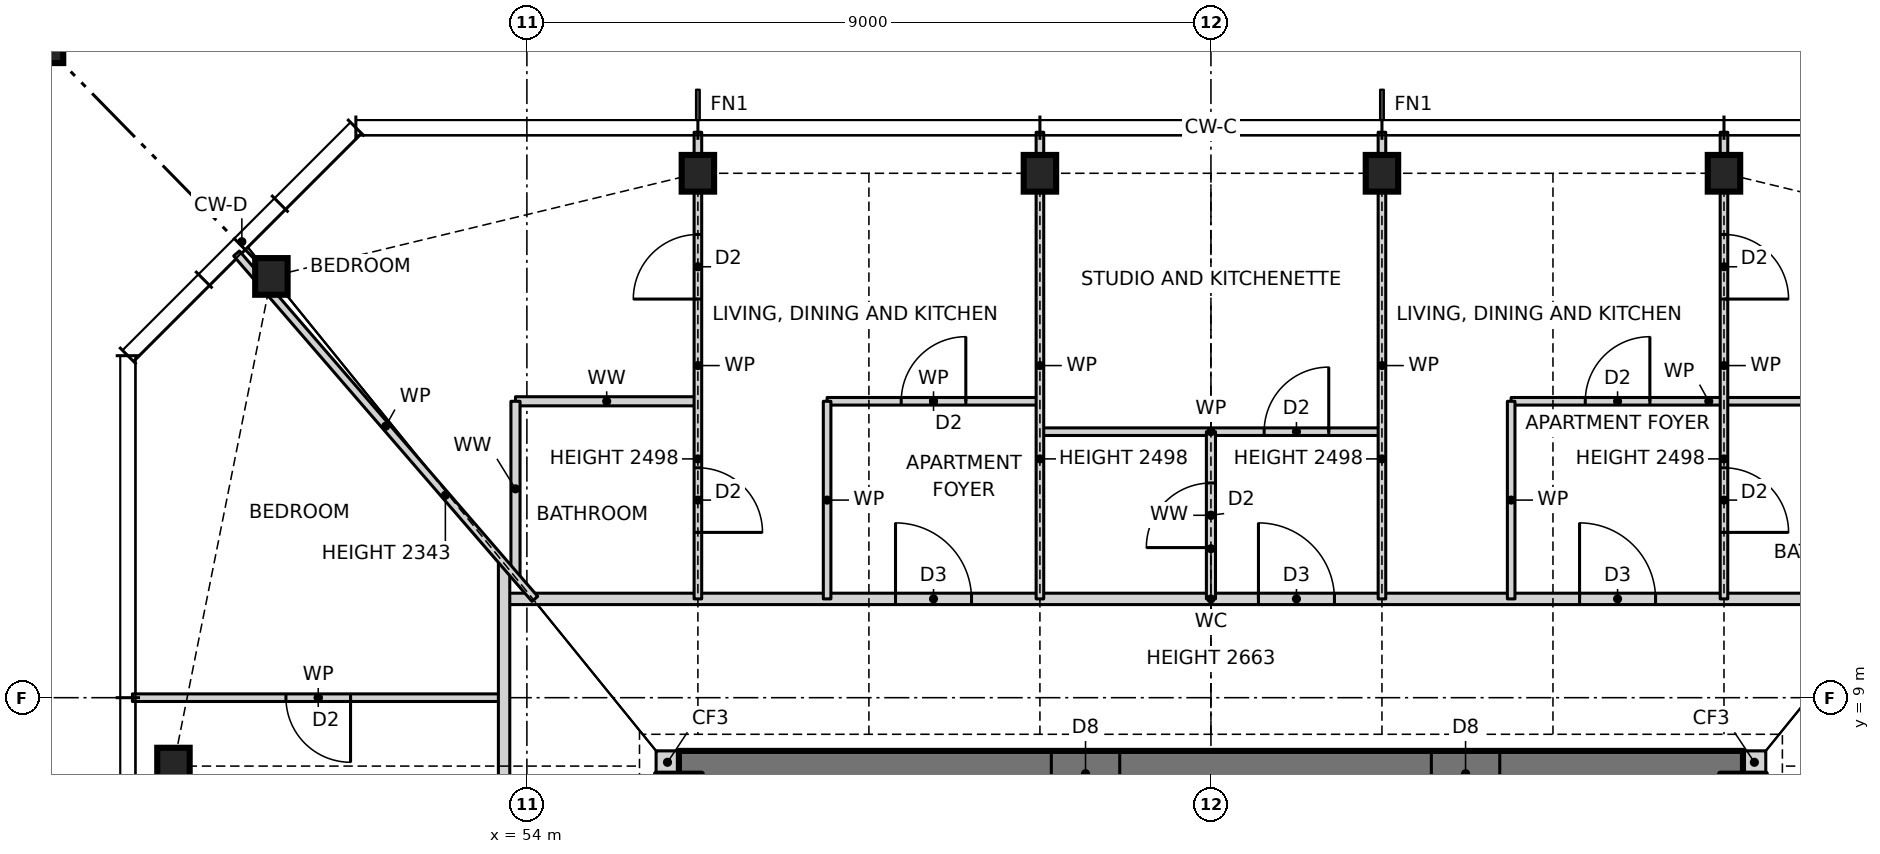
"""IFC4 building model, lengths in metres.
Left out: names, types, materials, properties, quantities, classifications, styles, units other than length and angle.
Written with IfcOpenShell. Run it as: python <this file> out.ifc"""

import sys

from ifc_helpers import new_model, si_unit, direction, frame, frame_2d, origin, origin_2d, place, context, subcontext, project, spatial, rectangle, hollow_rectangle, i_section, extrude, element, fill, save


model = new_model("IFC4")
c1 = context("Model", 3, precision=1e-05, world=origin(), true_north=direction((0.0, 1.0)))
c2 = subcontext(c1, "Body", "Model", "MODEL_VIEW")
j1 = project(units=[si_unit("LENGTHUNIT", "METRE"), si_unit("PLANEANGLEUNIT", "RADIAN")], contexts=[c1])
p1 = place(None, origin())
s1 = spatial("IfcSite", under=j1, at=p1, CompositionType="ELEMENT")
p2 = place(p1, origin())
s2 = spatial("IfcBuilding", under=s1, at=p2, CompositionType="ELEMENT")
p3 = place(p2, frame((0.0, 0.0, 94.5)))
s3 = spatial("IfcBuildingStorey", under=s2, at=p3, CompositionType="ELEMENT", Elevation=94.5)
for number, where, z_axis, x_axis in (
    (1, (69.75, 15.9, 0.0), (0.0, 0.0, 1.0), (1.0, 0.0, 0.0)),
    (2, (65.25, 15.9, 0.0), (0.0, 0.0, 1.0), (1.0, 0.0, 0.0)),
    (3, (60.75, 15.9, 0.0), (0.0, 0.0, 1.0), (1.0, 0.0, 0.0)),
    (4, (56.25, 15.9, 0.0), (0.0, 0.0, 1.0), (1.0, 0.0, 0.0)),
    (5, (50.639, 14.543, 0.0), (0.0, 0.0, 1.0), (1.0, 0.0, 0.0)),
    (6, (49.35, 8.1, 0.0), (0.0, 0.0, 1.0), (1.0, 0.0, 0.0)),
):
    element("IfcColumn", number, at=place(p3, frame(where, z_axis=z_axis, x_axis=x_axis)), inside=s3, PredefinedType="COLUMN", context=c2, shape_type="SweptSolid", body=[
        extrude(i_section(OverallWidth=0.427, OverallDepth=0.483, WebThickness=0.051, FlangeThickness=0.082, at=origin_2d()), origin(), (0.0, 0.0, 1.0), 3.5),
    ])
p4 = place(p3, frame((47.35, 17.9, 0.0), z_axis=(0.0, 0.0, 1.0), x_axis=(1.0, 0.0, 0.0)))
e7 = element("IfcColumn", 7, at=p4, inside=s3, PredefinedType="COLUMN", context=c2, shape_type="SweptSolid", body=[
    extrude(hollow_rectangle(XDim=1.1, YDim=1.1, WallThickness=0.06, at=origin_2d()), origin(), (0.0, 0.0, 1.0), 3.5),
])
for number, where, z_axis, x_axis in (
    (8, (70.0, 8.15, 0.0), (0.0, 0.0, 1.0), (1.0, 0.0, 0.0)),
    (9, (55.7, 8.15, 0.0), (0.0, 0.0, 1.0), (1.0, 0.0, 0.0)),
):
    element("IfcWall", number, at=place(p3, frame(where, z_axis=z_axis, x_axis=x_axis)), inside=s3, PredefinedType="SOLIDWALL", context=c2, shape_type="SweptSolid", body=[
        extrude(rectangle(XDim=0.3, YDim=0.3, at=frame_2d((0.15, 0.0))), origin(), (0.0, 0.0, 1.0), 3.5),
    ])
p5 = place(p3, frame((70.0, 8.0, 0.0), z_axis=(0.0, 0.0, 1.0), x_axis=(-1.0, 0.0, 0.0)))
e10 = element("IfcWall", 10, at=p5, inside=s3, PredefinedType="SHEAR", context=c2, shape_type="SweptSolid", body=[
    extrude(rectangle(XDim=14.0, YDim=0.6, at=frame_2d((7.0, 0.0))), origin(), (0.0, 0.0, 1.0), 3.5),
])
p6 = place(p5, frame((8.2, 0.0, 0.0)))
e11 = element("IfcOpeningElement", 11, at=p6, cuts=e10, PredefinedType="OPENING", context=c2, shape_type="SweptSolid", body=[
    extrude(rectangle(XDim=0.9, YDim=2.1, at=frame_2d((0.45, 1.05))), frame((0.0, 0.31, 0.0), z_axis=(0.0, -1.0, 0.0), x_axis=(1.0, 0.0, 0.0)), (0.0, 0.0, 1.0), 0.62),
])
p7 = place(p5, frame((3.2, 0.0, 0.0)))
e12 = element("IfcOpeningElement", 12, at=p7, cuts=e10, PredefinedType="OPENING", context=c2, shape_type="SweptSolid", body=[
    extrude(rectangle(XDim=0.9, YDim=2.1, at=frame_2d((0.45, 1.05))), frame((0.0, 0.31, 0.0), z_axis=(0.0, -1.0, 0.0), x_axis=(1.0, 0.0, 0.0)), (0.0, 0.0, 1.0), 0.62),
])
p8 = place(p3, frame((48.81, 9.0, 0.0), z_axis=(0.0, 0.0, 1.0), x_axis=(1.0, 0.0, 0.0)))
e13 = element("IfcWall", 13, at=p8, inside=s3, PredefinedType="PARTITIONING", context=c2, shape_type="SweptSolid", body=[
    extrude(rectangle(XDim=4.89, YDim=0.1, at=frame_2d((2.445, 0.0))), origin(), (0.0, 0.0, 1.0), 3.27),
])
p9 = place(p8, frame((2.02, 0.0, 0.0)))
e14 = element("IfcOpeningElement", 14, at=p9, cuts=e13, PredefinedType="OPENING", context=c2, shape_type="SweptSolid", body=[
    extrude(rectangle(XDim=0.85, YDim=2.1, at=frame_2d((0.425, 1.05))), frame((0.0, 0.06, 0.0), z_axis=(0.0, -1.0, 0.0), x_axis=(1.0, 0.0, 0.0)), (0.0, 0.0, 1.0), 0.12),
])
p10 = place(p3, frame((53.7, 10.3, 0.0), z_axis=(0.0, 0.0, 1.0), x_axis=(1.0, 0.0, 0.0)))
e15 = element("IfcWall", 15, at=p10, inside=s3, PredefinedType="PARTITIONING", context=c2, shape_type="SweptSolid", body=[
    extrude(rectangle(XDim=18.6, YDim=0.15, at=frame_2d((9.3, 0.0))), origin(), (0.0, 0.0, 1.0), 3.27),
])
p11 = place(p10, frame((14.15, 0.0, 0.0)))
e16 = element("IfcOpeningElement", 16, at=p11, cuts=e15, PredefinedType="OPENING", context=c2, shape_type="SweptSolid", body=[
    extrude(rectangle(XDim=1.0, YDim=2.1, at=frame_2d((0.5, 1.05))), frame((0.0, 0.085, 0.0), z_axis=(0.0, -1.0, 0.0), x_axis=(1.0, 0.0, 0.0)), (0.0, 0.0, 1.0), 0.17),
])
p12 = place(p10, frame((9.925, 0.0, 0.0)))
e17 = element("IfcOpeningElement", 17, at=p12, cuts=e15, PredefinedType="OPENING", context=c2, shape_type="SweptSolid", body=[
    extrude(rectangle(XDim=1.0, YDim=2.1, at=frame_2d((0.5, 1.05))), frame((0.0, 0.085, 0.0), z_axis=(0.0, -1.0, 0.0), x_axis=(1.0, 0.0, 0.0)), (0.0, 0.0, 1.0), 0.17),
])
p13 = place(p10, frame((5.15, 0.0, 0.0)))
e18 = element("IfcOpeningElement", 18, at=p13, cuts=e15, PredefinedType="OPENING", context=c2, shape_type="SweptSolid", body=[
    extrude(rectangle(XDim=1.0, YDim=2.1, at=frame_2d((0.5, 1.05))), frame((0.0, 0.085, 0.0), z_axis=(0.0, -1.0, 0.0), x_axis=(1.0, 0.0, 0.0)), (0.0, 0.0, 1.0), 0.17),
])
p14 = place(p3, frame((60.75, 12.5, 0.0), z_axis=(0.0, 0.0, 1.0), x_axis=(1.0, 0.0, 0.0)))
e19 = element("IfcWall", 19, at=p14, inside=s3, PredefinedType="PARTITIONING", context=c2, shape_type="SweptSolid", body=[
    extrude(rectangle(XDim=4.5, YDim=0.1, at=frame_2d((2.25, 0.0))), origin(), (0.0, 0.0, 1.0), 3.27),
])
p15 = place(p14, frame((2.95, 0.0, 0.0)))
e20 = element("IfcOpeningElement", 20, at=p15, cuts=e19, PredefinedType="OPENING", context=c2, shape_type="SweptSolid", body=[
    extrude(rectangle(XDim=0.85, YDim=2.1, at=frame_2d((0.425, 1.05))), frame((0.0, 0.06, 0.0), z_axis=(0.0, -1.0, 0.0), x_axis=(1.0, 0.0, 0.0)), (0.0, 0.0, 1.0), 0.12),
])
p16 = place(p3, frame((53.85, 12.9, 0.0), z_axis=(0.0, 0.0, 1.0), x_axis=(1.0, 0.0, 0.0)))
e21 = element("IfcWall", 21, at=p16, inside=s3, PredefinedType="PARTITIONING", context=c2, shape_type="SweptSolid", body=[
    extrude(rectangle(XDim=2.4, YDim=0.12, at=frame_2d((1.2, 0.0))), origin(), (0.0, 0.0, 1.0), 3.27),
])
p17 = place(p3, frame((57.95, 12.9, 0.0), z_axis=(0.0, 0.0, 1.0), x_axis=(1.0, 0.0, 0.0)))
e22 = element("IfcWall", 22, at=p17, inside=s3, PredefinedType="PARTITIONING", context=c2, shape_type="SweptSolid", body=[
    extrude(rectangle(XDim=2.8, YDim=0.1, at=frame_2d((1.4, 0.0))), origin(), (0.0, 0.0, 1.0), 3.27),
])
p18 = place(p17, frame((0.975, 0.0, 0.0)))
e23 = element("IfcOpeningElement", 23, at=p18, cuts=e22, PredefinedType="OPENING", context=c2, shape_type="SweptSolid", body=[
    extrude(rectangle(XDim=0.85, YDim=2.1, at=frame_2d((0.425, 1.05))), frame((0.0, 0.06, 0.0), z_axis=(0.0, -1.0, 0.0), x_axis=(1.0, 0.0, 0.0)), (0.0, 0.0, 1.0), 0.12),
])
p19 = place(p3, frame((66.95, 12.9, 0.0), z_axis=(0.0, 0.0, 1.0), x_axis=(1.0, 0.0, 0.0)))
e24 = element("IfcWall", 24, at=p19, inside=s3, PredefinedType="PARTITIONING", context=c2, shape_type="SweptSolid", body=[
    extrude(rectangle(XDim=5.2, YDim=0.1, at=frame_2d((2.6, 0.0))), origin(), (0.0, 0.0, 1.0), 3.27),
])
p20 = place(p19, frame((0.975, 0.0, 0.0)))
e25 = element("IfcOpeningElement", 25, at=p20, cuts=e24, PredefinedType="OPENING", context=c2, shape_type="SweptSolid", body=[
    extrude(rectangle(XDim=0.85, YDim=2.1, at=frame_2d((0.425, 1.05))), frame((0.0, 0.06, 0.0), z_axis=(0.0, -1.0, 0.0), x_axis=(1.0, 0.0, 0.0)), (0.0, 0.0, 1.0), 0.12),
])
p21 = place(p3, frame((69.75, 10.3, 0.0), z_axis=(0.0, 0.0, 1.0), x_axis=(0.0, 1.0, 0.0)))
e26 = element("IfcWall", 26, at=p21, inside=s3, PredefinedType="PARTITIONING", context=c2, shape_type="SweptSolid", body=[
    extrude(rectangle(XDim=6.14, YDim=0.1, at=frame_2d((3.07, 0.0))), origin(), (0.0, 0.0, 1.0), 2.498),
])
p22 = place(p21, frame((0.875, 0.0, 0.0)))
e27 = element("IfcOpeningElement", 27, at=p22, cuts=e26, PredefinedType="OPENING", context=c2, shape_type="SweptSolid", body=[
    extrude(rectangle(XDim=0.85, YDim=2.1, at=frame_2d((0.425, 1.05))), frame((0.0, 0.06, 0.0), z_axis=(0.0, -1.0, 0.0), x_axis=(1.0, 0.0, 0.0)), (0.0, 0.0, 1.0), 0.12),
])
p23 = place(p21, frame((3.945, 0.0, 0.0)))
e28 = element("IfcOpeningElement", 28, at=p23, cuts=e26, PredefinedType="OPENING", context=c2, shape_type="SweptSolid", body=[
    extrude(rectangle(XDim=0.85, YDim=2.1, at=frame_2d((0.425, 1.05))), frame((0.0, 0.06, 0.0), z_axis=(0.0, -1.0, 0.0), x_axis=(1.0, 0.0, 0.0)), (0.0, 0.0, 1.0), 0.12),
])
p24 = place(p3, frame((66.95, 10.3, 0.0), z_axis=(0.0, 0.0, 1.0), x_axis=(0.0, 1.0, 0.0)))
e29 = element("IfcWall", 29, at=p24, inside=s3, PredefinedType="PARTITIONING", context=c2, shape_type="SweptSolid", body=[
    extrude(rectangle(XDim=2.6, YDim=0.1, at=frame_2d((1.3, 0.0))), origin(), (0.0, 0.0, 1.0), 3.27),
])
p25 = place(p3, frame((65.25, 10.3, 0.0), z_axis=(0.0, 0.0, 1.0), x_axis=(0.0, 1.0, 0.0)))
e30 = element("IfcWall", 30, at=p25, inside=s3, PredefinedType="PARTITIONING", context=c2, shape_type="SweptSolid", body=[
    extrude(rectangle(XDim=6.14, YDim=0.1, at=frame_2d((3.07, 0.0))), origin(), (0.0, 0.0, 1.0), 2.498),
])
p26 = place(p3, frame((63.0, 10.3, 0.0), z_axis=(0.0, 0.0, 1.0), x_axis=(0.0, 1.0, 0.0)))
e31 = element("IfcWall", 31, at=p26, inside=s3, PredefinedType="PARTITIONING", context=c2, shape_type="SweptSolid", body=[
    extrude(rectangle(XDim=2.2, YDim=0.12, at=frame_2d((1.1, 0.0))), origin(), (0.0, 0.0, 1.0), 2.663),
])
p27 = place(p26, frame((0.675, 0.0, 0.0)))
e32 = element("IfcOpeningElement", 32, at=p27, cuts=e31, PredefinedType="OPENING", context=c2, shape_type="SweptSolid", body=[
    extrude(rectangle(XDim=0.85, YDim=2.1, at=frame_2d((0.425, 1.05))), frame((0.0, 0.07, 0.0), z_axis=(0.0, -1.0, 0.0), x_axis=(1.0, 0.0, 0.0)), (0.0, 0.0, 1.0), 0.14),
])
p28 = place(p3, frame((60.75, 10.3, 0.0), z_axis=(0.0, 0.0, 1.0), x_axis=(0.0, 1.0, 0.0)))
e33 = element("IfcWall", 33, at=p28, inside=s3, PredefinedType="PARTITIONING", context=c2, shape_type="SweptSolid", body=[
    extrude(rectangle(XDim=6.14, YDim=0.1, at=frame_2d((3.07, 0.0))), origin(), (0.0, 0.0, 1.0), 2.498),
])
p29 = place(p3, frame((57.95, 10.3, 0.0), z_axis=(0.0, 0.0, 1.0), x_axis=(0.0, 1.0, 0.0)))
e34 = element("IfcWall", 34, at=p29, inside=s3, PredefinedType="PARTITIONING", context=c2, shape_type="SweptSolid", body=[
    extrude(rectangle(XDim=2.6, YDim=0.1, at=frame_2d((1.3, 0.0))), origin(), (0.0, 0.0, 1.0), 3.27),
])
p30 = place(p3, frame((56.25, 10.3, 0.0), z_axis=(0.0, 0.0, 1.0), x_axis=(0.0, 1.0, 0.0)))
e35 = element("IfcWall", 35, at=p30, inside=s3, PredefinedType="PARTITIONING", context=c2, shape_type="SweptSolid", body=[
    extrude(rectangle(XDim=6.14, YDim=0.1, at=frame_2d((3.07, 0.0))), origin(), (0.0, 0.0, 1.0), 2.498),
])
p31 = place(p30, frame((0.875, 0.0, 0.0)))
e36 = element("IfcOpeningElement", 36, at=p31, cuts=e35, PredefinedType="OPENING", context=c2, shape_type="SweptSolid", body=[
    extrude(rectangle(XDim=0.85, YDim=2.1, at=frame_2d((0.425, 1.05))), frame((0.0, 0.06, 0.0), z_axis=(0.0, -1.0, 0.0), x_axis=(1.0, 0.0, 0.0)), (0.0, 0.0, 1.0), 0.12),
])
p32 = place(p30, frame((3.945, 0.0, 0.0)))
e37 = element("IfcOpeningElement", 37, at=p32, cuts=e35, PredefinedType="OPENING", context=c2, shape_type="SweptSolid", body=[
    extrude(rectangle(XDim=0.85, YDim=2.1, at=frame_2d((0.425, 1.05))), frame((0.0, 0.06, 0.0), z_axis=(0.0, -1.0, 0.0), x_axis=(1.0, 0.0, 0.0)), (0.0, 0.0, 1.0), 0.12),
])
p33 = place(p3, frame((53.85, 10.595, 0.0), z_axis=(0.0, 0.0, 1.0), x_axis=(0.0, 1.0, 0.0)))
e38 = element("IfcWall", 38, at=p33, inside=s3, PredefinedType="PARTITIONING", context=c2, shape_type="SweptSolid", body=[
    extrude(rectangle(XDim=2.305, YDim=0.12, at=frame_2d((1.152, 0.0))), origin(), (0.0, 0.0, 1.0), 3.27),
])
p34 = place(p3, frame((53.7, -10.768, 0.0), z_axis=(0.0, 0.0, 1.0), x_axis=(0.0, 1.0, 0.0)))
e39 = element("IfcWall", 39, at=p34, inside=s3, PredefinedType="PARTITIONING", context=c2, shape_type="SweptSolid", body=[
    extrude(rectangle(XDim=21.536, YDim=0.15, at=frame_2d((10.768, 0.0))), origin(), (0.0, 0.0, 1.0), 3.27),
])
p35 = place(p34, frame((10.268, 0.0, 0.0)))
e40 = element("IfcOpeningElement", 40, at=p35, cuts=e39, PredefinedType="OPENING", context=c2, shape_type="SweptSolid", body=[
    extrude(rectangle(XDim=1.0, YDim=2.1, at=frame_2d((0.5, 1.05))), frame((0.0, 0.085, 0.0), z_axis=(0.0, -1.0, 0.0), x_axis=(1.0, 0.0, 0.0)), (0.0, 0.0, 1.0), 0.17),
])
p36 = place(p3, frame((54.105, 10.3, 0.0), z_axis=(0.0, 0.0, 1.0), x_axis=(-0.653606109319, 0.756834892074, 0.0)))
e41 = element("IfcWall", 41, at=p36, inside=s3, PredefinedType="PARTITIONING", context=c2, shape_type="SweptSolid", body=[
    extrude(rectangle(XDim=6.005, YDim=0.1, at=frame_2d((3.002, 0.0))), origin(), (0.0, 0.0, 1.0), 2.343),
])
p37 = place(p11, origin())
e42 = element("IfcDoor", 42, at=p37, inside=s3, OperationType="SINGLE_SWING_LEFT", PredefinedType="DOOR", context=c2, shape_type="SweptSolid", body=[
    extrude(rectangle(XDim=1.0, YDim=2.1, at=frame_2d((0.5, 1.05))), frame((0.0, 0.025, 0.0), z_axis=(0.0, -1.0, 0.0), x_axis=(1.0, 0.0, 0.0)), (0.0, 0.0, 1.0), 0.05),
])
fill(e16, e42)
p38 = place(p20, origin())
e43 = element("IfcDoor", 43, at=p38, inside=s3, OperationType="SINGLE_SWING_RIGHT", PredefinedType="DOOR", context=c2, shape_type="SweptSolid", body=[
    extrude(rectangle(XDim=0.85, YDim=2.1, at=frame_2d((0.425, 1.05))), frame((0.0, 0.025, 0.0), z_axis=(0.0, -1.0, 0.0), x_axis=(1.0, 0.0, 0.0)), (0.0, 0.0, 1.0), 0.05),
])
fill(e25, e43)
p39 = place(p22, frame((0.85, 0.0, 0.0), z_axis=(0.0, 0.0, 1.0), x_axis=(-1.0, 0.0, 0.0)))
e44 = element("IfcDoor", 44, at=p39, inside=s3, OperationType="SINGLE_SWING_RIGHT", PredefinedType="DOOR", context=c2, shape_type="SweptSolid", body=[
    extrude(rectangle(XDim=0.85, YDim=2.1, at=frame_2d((0.425, 1.05))), frame((0.0, 0.025, 0.0), z_axis=(0.0, -1.0, 0.0), x_axis=(1.0, 0.0, 0.0)), (0.0, 0.0, 1.0), 0.05),
])
fill(e27, e44)
p40 = place(p23, frame((0.85, 0.0, 0.0), z_axis=(0.0, 0.0, 1.0), x_axis=(-1.0, 0.0, 0.0)))
e45 = element("IfcDoor", 45, at=p40, inside=s3, OperationType="SINGLE_SWING_RIGHT", PredefinedType="DOOR", context=c2, shape_type="SweptSolid", body=[
    extrude(rectangle(XDim=0.85, YDim=2.1, at=frame_2d((0.425, 1.05))), frame((0.0, 0.025, 0.0), z_axis=(0.0, -1.0, 0.0), x_axis=(1.0, 0.0, 0.0)), (0.0, 0.0, 1.0), 0.05),
])
fill(e28, e45)
p41 = place(p15, origin())
e46 = element("IfcDoor", 46, at=p41, inside=s3, OperationType="SINGLE_SWING_RIGHT", PredefinedType="DOOR", context=c2, shape_type="SweptSolid", body=[
    extrude(rectangle(XDim=0.85, YDim=2.1, at=frame_2d((0.425, 1.05))), frame((0.0, 0.025, 0.0), z_axis=(0.0, -1.0, 0.0), x_axis=(1.0, 0.0, 0.0)), (0.0, 0.0, 1.0), 0.05),
])
fill(e20, e46)
p42 = place(p12, origin())
e47 = element("IfcDoor", 47, at=p42, inside=s3, OperationType="SINGLE_SWING_LEFT", PredefinedType="DOOR", context=c2, shape_type="SweptSolid", body=[
    extrude(rectangle(XDim=1.0, YDim=2.1, at=frame_2d((0.5, 1.05))), frame((0.0, 0.025, 0.0), z_axis=(0.0, -1.0, 0.0), x_axis=(1.0, 0.0, 0.0)), (0.0, 0.0, 1.0), 0.05),
])
fill(e17, e47)
p43 = place(p27, origin())
e48 = element("IfcDoor", 48, at=p43, inside=s3, OperationType="SINGLE_SWING_LEFT", PredefinedType="DOOR", context=c2, shape_type="SweptSolid", body=[
    extrude(rectangle(XDim=0.85, YDim=2.1, at=frame_2d((0.425, 1.05))), frame((0.0, 0.025, 0.0), z_axis=(0.0, -1.0, 0.0), x_axis=(1.0, 0.0, 0.0)), (0.0, 0.0, 1.0), 0.05),
])
fill(e32, e48)
p44 = place(p13, origin())
e49 = element("IfcDoor", 49, at=p44, inside=s3, OperationType="SINGLE_SWING_LEFT", PredefinedType="DOOR", context=c2, shape_type="SweptSolid", body=[
    extrude(rectangle(XDim=1.0, YDim=2.1, at=frame_2d((0.5, 1.05))), frame((0.0, 0.025, 0.0), z_axis=(0.0, -1.0, 0.0), x_axis=(1.0, 0.0, 0.0)), (0.0, 0.0, 1.0), 0.05),
])
fill(e18, e49)
p45 = place(p18, origin())
e50 = element("IfcDoor", 50, at=p45, inside=s3, OperationType="SINGLE_SWING_RIGHT", PredefinedType="DOOR", context=c2, shape_type="SweptSolid", body=[
    extrude(rectangle(XDim=0.85, YDim=2.1, at=frame_2d((0.425, 1.05))), frame((0.0, 0.025, 0.0), z_axis=(0.0, -1.0, 0.0), x_axis=(1.0, 0.0, 0.0)), (0.0, 0.0, 1.0), 0.05),
])
fill(e23, e50)
p46 = place(p31, frame((0.85, 0.0, 0.0), z_axis=(0.0, 0.0, 1.0), x_axis=(-1.0, 0.0, 0.0)))
e51 = element("IfcDoor", 51, at=p46, inside=s3, OperationType="SINGLE_SWING_RIGHT", PredefinedType="DOOR", context=c2, shape_type="SweptSolid", body=[
    extrude(rectangle(XDim=0.85, YDim=2.1, at=frame_2d((0.425, 1.05))), frame((0.0, 0.025, 0.0), z_axis=(0.0, -1.0, 0.0), x_axis=(1.0, 0.0, 0.0)), (0.0, 0.0, 1.0), 0.05),
])
fill(e36, e51)
p47 = place(p32, origin())
e52 = element("IfcDoor", 52, at=p47, inside=s3, OperationType="SINGLE_SWING_LEFT", PredefinedType="DOOR", context=c2, shape_type="SweptSolid", body=[
    extrude(rectangle(XDim=0.85, YDim=2.1, at=frame_2d((0.425, 1.05))), frame((0.0, 0.025, 0.0), z_axis=(0.0, -1.0, 0.0), x_axis=(1.0, 0.0, 0.0)), (0.0, 0.0, 1.0), 0.05),
])
fill(e37, e52)
p48 = place(p9, frame((0.85, 0.0, 0.0), z_axis=(0.0, 0.0, 1.0), x_axis=(-1.0, 0.0, 0.0)))
e53 = element("IfcDoor", 53, at=p48, inside=s3, OperationType="SINGLE_SWING_LEFT", PredefinedType="DOOR", context=c2, shape_type="SweptSolid", body=[
    extrude(rectangle(XDim=0.85, YDim=2.1, at=frame_2d((0.425, 1.05))), frame((0.0, 0.025, 0.0), z_axis=(0.0, -1.0, 0.0), x_axis=(1.0, 0.0, 0.0)), (0.0, 0.0, 1.0), 0.05),
])
fill(e14, e53)
p49 = place(p6, origin())
e54 = element("IfcDoor", 54, at=p49, inside=s3, OperationType="SINGLE_SWING_RIGHT", PredefinedType="DOOR", context=c2, shape_type="SweptSolid", body=[
    extrude(rectangle(XDim=0.9, YDim=2.1, at=frame_2d((0.45, 1.05))), frame((0.0, 0.025, 0.0), z_axis=(0.0, -1.0, 0.0), x_axis=(1.0, 0.0, 0.0)), (0.0, 0.0, 1.0), 0.05),
])
fill(e11, e54)
p50 = place(p7, origin())
e55 = element("IfcDoor", 55, at=p50, inside=s3, OperationType="SINGLE_SWING_RIGHT", PredefinedType="DOOR", context=c2, shape_type="SweptSolid", body=[
    extrude(rectangle(XDim=0.9, YDim=2.1, at=frame_2d((0.45, 1.05))), frame((0.0, 0.025, 0.0), z_axis=(0.0, -1.0, 0.0), x_axis=(1.0, 0.0, 0.0)), (0.0, 0.0, 1.0), 0.05),
])
fill(e12, e55)
save(model, sys.argv[1])
